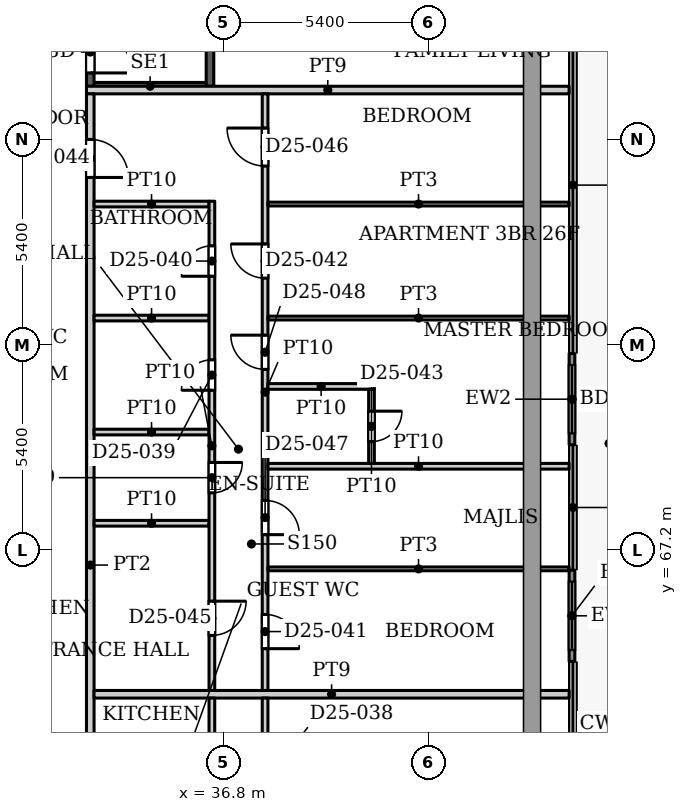
"""IFC4 building model, lengths in metres.
Left out: names, types, materials, properties, quantities, classifications, styles, units other than length and angle.
Written with IfcOpenShell. Run it as: python <this file> out.ifc"""

import sys

from ifc_helpers import new_model, si_unit, direction, frame, frame_2d, origin, place, context, subcontext, project, spatial, rectangle, extrude, source, transform, mapped, element, fill, save


model = new_model("IFC4")
c1 = context("Model", 3, precision=1e-05, world=origin(), true_north=direction((0.0, 1.0)))
c2 = subcontext(c1, "Body", "Model", "MODEL_VIEW")
j1 = project(units=[si_unit("LENGTHUNIT", "METRE"), si_unit("PLANEANGLEUNIT", "RADIAN")], contexts=[c1])
p1 = place(None, origin())
s1 = spatial("IfcSite", under=j1, at=p1, CompositionType="ELEMENT")
p2 = place(p1, origin())
s2 = spatial("IfcBuilding", under=s1, at=p2, CompositionType="ELEMENT")
p3 = place(p2, frame((0.0, 0.0, 113.6)))
s3 = spatial("IfcBuildingStorey", under=s2, at=p3, CompositionType="ELEMENT", Elevation=113.6)
p4 = place(p3, frame((45.975, 72.365, 0.0), z_axis=(0.0, 0.0, 1.0), x_axis=(0.0, -1.0, 0.0)))
e1 = element("IfcWall", 1, at=p4, inside=s3, PredefinedType="SOLIDWALL", context=c2, shape_type="SweptSolid", body=[
    extrude(rectangle(XDim=2.4, YDim=0.15, at=frame_2d((1.2, 0.0))), origin(), (0.0, 0.0, 1.0), 3.75),
])
p5 = place(p4, frame((0.3, 0.0, 0.0)))
e2 = element("IfcOpeningElement", 2, at=p5, cuts=e1, PredefinedType="OPENING", context=c2, shape_type="SweptSolid", body=[
    extrude(rectangle(XDim=1.8, YDim=2.4, at=frame_2d((0.9, 1.2))), frame((0.0, 0.085, 0.0), z_axis=(0.0, -1.0, 0.0), x_axis=(1.0, 0.0, 0.0)), (0.0, 0.0, 1.0), 0.17),
])
p6 = place(p3, frame((45.975, 66.665, 0.0), z_axis=(0.0, 0.0, 1.0), x_axis=(0.0, -1.0, 0.0)))
e3 = element("IfcWall", 3, at=p6, inside=s3, PredefinedType="SOLIDWALL", context=c2, shape_type="SweptSolid", body=[
    extrude(rectangle(XDim=2.4, YDim=0.15, at=frame_2d((1.2, 0.0))), origin(), (0.0, 0.0, 1.0), 3.75),
])
p7 = place(p6, frame((0.3, 0.0, 0.0)))
e4 = element("IfcOpeningElement", 4, at=p7, cuts=e3, PredefinedType="OPENING", context=c2, shape_type="SweptSolid", body=[
    extrude(rectangle(XDim=1.8, YDim=2.4, at=frame_2d((0.9, 1.2))), frame((0.0, 0.085, 0.0), z_axis=(0.0, -1.0, 0.0), x_axis=(1.0, 0.0, 0.0)), (0.0, 0.0, 1.0), 0.17),
])
p8 = place(p3, frame((33.3, 79.4, 0.0), z_axis=(0.0, 0.0, 1.0), x_axis=(1.0, 0.0, 0.0)))
e5 = element("IfcWall", 5, at=p8, inside=s3, PredefinedType="SHEAR", context=c2, shape_type="SweptSolid", body=[
    extrude(rectangle(XDim=3.15, YDim=0.2, at=frame_2d((1.575, 0.0))), origin(), (0.0, 0.0, 1.0), 3.9),
])
p9 = place(p3, frame((33.3, 79.4, 0.0), z_axis=(0.0, 0.0, 1.0), x_axis=(0.0, 1.0, 0.0)))
e6 = element("IfcWall", 6, at=p9, inside=s3, PredefinedType="SHEAR", context=c2, shape_type="SweptSolid", body=[
    extrude(rectangle(XDim=9.16, YDim=0.2, at=frame_2d((4.58, 0.0))), origin(), (0.0, 0.0, 1.0), 3.9),
])
p10 = place(p9, frame((0.35, 0.0, 0.0)))
e7 = element("IfcOpeningElement", 7, at=p10, cuts=e6, PredefinedType="OPENING", context=c2, shape_type="SweptSolid", body=[
    extrude(rectangle(XDim=1.1, YDim=2.2, at=frame_2d((0.55, 1.1))), frame((0.0, 0.11, 0.0), z_axis=(0.0, -1.0, 0.0), x_axis=(1.0, 0.0, 0.0)), (0.0, 0.0, 1.0), 0.22),
])
p11 = place(p3, frame((36.45, 79.4, 0.0), z_axis=(0.0, 0.0, 1.0), x_axis=(0.0, 1.0, 0.0)))
e8 = element("IfcWall", 8, at=p11, inside=s3, PredefinedType="SHEAR", context=c2, shape_type="SweptSolid", body=[
    extrude(rectangle(XDim=9.16, YDim=0.2, at=frame_2d((4.58, 0.0))), origin(), (0.0, 0.0, 1.0), 3.9),
])
p12 = place(p3, frame((33.2, 79.3, 0.0), z_axis=(0.0, 0.0, 1.0), x_axis=(1.0, 0.0, 0.0)))
e9 = element("IfcWall", 9, at=p12, inside=s3, PredefinedType="PARTITIONING", context=c2, shape_type="SweptSolid", body=[
    extrude(rectangle(XDim=12.7, YDim=0.2, at=frame_2d((6.35, 0.0))), origin(), (0.0, 0.0, 1.0), 3.6),
])
p13 = place(p3, frame((33.3, 54.4, 0.0), z_axis=(0.0, 0.0, 1.0), x_axis=(0.0, 1.0, 0.0)))
e10 = element("IfcWall", 10, at=p13, inside=s3, PredefinedType="PARTITIONING", context=c2, shape_type="SweptSolid", body=[
    extrude(rectangle(XDim=24.8, YDim=0.2, at=frame_2d((12.4, 0.0))), origin(), (0.0, 0.0, 1.0), 3.6),
])
p14 = place(p13, frame((2.5, 0.0, 0.0)))
e11 = element("IfcOpeningElement", 11, at=p14, cuts=e10, PredefinedType="OPENING", context=c2, shape_type="SweptSolid", body=[
    extrude(rectangle(XDim=1.0, YDim=2.1, at=frame_2d((0.5, 1.05))), frame((0.0, 0.11, 0.0), z_axis=(0.0, -1.0, 0.0), x_axis=(1.0, 0.0, 0.0)), (0.0, 0.0, 1.0), 0.22),
])
p15 = place(p13, frame((22.6, 0.0, 0.0)))
e12 = element("IfcOpeningElement", 12, at=p15, cuts=e10, PredefinedType="OPENING", context=c2, shape_type="SweptSolid", body=[
    extrude(rectangle(XDim=1.0, YDim=2.1, at=frame_2d((0.5, 1.05))), frame((0.0, 0.11, 0.0), z_axis=(0.0, -1.0, 0.0), x_axis=(1.0, 0.0, 0.0)), (0.0, 0.0, 1.0), 0.22),
])
p16 = place(p3, frame((33.4, 63.4, 0.0), z_axis=(0.0, 0.0, 1.0), x_axis=(1.0, 0.0, 0.0)))
e13 = element("IfcWall", 13, at=p16, inside=s3, PredefinedType="PARTITIONING", context=c2, shape_type="SweptSolid", body=[
    extrude(rectangle(XDim=12.5, YDim=0.2, at=frame_2d((6.25, 0.0))), origin(), (0.0, 0.0, 1.0), 3.6),
])
for number, where, z_axis, x_axis in (
    (14, (33.4, 67.9, 0.0), (0.0, 0.0, 1.0), (1.0, 0.0, 0.0)),
    (15, (33.4, 70.3, 0.0), (0.0, 0.0, 1.0), (1.0, 0.0, 0.0)),
    (16, (33.4, 73.3, 0.0), (0.0, 0.0, 1.0), (1.0, 0.0, 0.0)),
    (17, (33.4, 76.3, 0.0), (0.0, 0.0, 1.0), (1.0, 0.0, 0.0)),
):
    element("IfcWall", number, at=place(p3, frame(where, z_axis=z_axis, x_axis=x_axis)), inside=s3, PredefinedType="PARTITIONING", context=c2, shape_type="SweptSolid", body=[
        extrude(rectangle(XDim=3.025, YDim=0.15, at=frame_2d((1.513, 0.0))), origin(), (0.0, 0.0, 1.0), 3.6),
    ])
p17 = place(p3, frame((36.5, 58.225, 0.0), z_axis=(0.0, 0.0, 1.0), x_axis=(0.0, 1.0, 0.0)))
e18 = element("IfcWall", 18, at=p17, inside=s3, PredefinedType="PARTITIONING", context=c2, shape_type="SweptSolid", body=[
    extrude(rectangle(XDim=5.075, YDim=0.15, at=frame_2d((2.538, 0.0))), origin(), (0.0, 0.0, 1.0), 3.6),
])
p18 = place(p17, frame((3.075, 0.0, 0.0)))
e19 = element("IfcOpeningElement", 19, at=p18, cuts=e18, PredefinedType="OPENING", context=c2, shape_type="SweptSolid", body=[
    extrude(rectangle(XDim=0.9, YDim=2.1, at=frame_2d((0.45, 1.05))), frame((0.0, 0.085, 0.0), z_axis=(0.0, -1.0, 0.0), x_axis=(1.0, 0.0, 0.0)), (0.0, 0.0, 1.0), 0.17),
])
p19 = place(p17, frame((0.575, 0.0, 0.0)))
e20 = element("IfcOpeningElement", 20, at=p19, cuts=e18, PredefinedType="OPENING", context=c2, shape_type="SweptSolid", body=[
    extrude(rectangle(XDim=0.8, YDim=2.1, at=frame_2d((0.4, 1.05))), frame((0.0, 0.085, 0.0), z_axis=(0.0, -1.0, 0.0), x_axis=(1.0, 0.0, 0.0)), (0.0, 0.0, 1.0), 0.17),
])
p20 = place(p3, frame((36.5, 63.5, 0.0), z_axis=(0.0, 0.0, 1.0), x_axis=(0.0, 1.0, 0.0)))
e21 = element("IfcWall", 21, at=p20, inside=s3, PredefinedType="PARTITIONING", context=c2, shape_type="SweptSolid", body=[
    extrude(rectangle(XDim=12.875, YDim=0.15, at=frame_2d((6.438, 0.0))), origin(), (0.0, 0.0, 1.0), 3.6),
])
p21 = place(p20, frame((7.9, 0.0, 0.0)))
e22 = element("IfcOpeningElement", 22, at=p21, cuts=e21, PredefinedType="OPENING", context=c2, shape_type="SweptSolid", body=[
    extrude(rectangle(XDim=0.8, YDim=2.1, at=frame_2d((0.4, 1.05))), frame((0.0, 0.085, 0.0), z_axis=(0.0, -1.0, 0.0), x_axis=(1.0, 0.0, 0.0)), (0.0, 0.0, 1.0), 0.17),
])
p22 = place(p20, frame((10.9, 0.0, 0.0)))
e23 = element("IfcOpeningElement", 23, at=p22, cuts=e21, PredefinedType="OPENING", context=c2, shape_type="SweptSolid", body=[
    extrude(rectangle(XDim=0.8, YDim=2.1, at=frame_2d((0.4, 1.05))), frame((0.0, 0.085, 0.0), z_axis=(0.0, -1.0, 0.0), x_axis=(1.0, 0.0, 0.0)), (0.0, 0.0, 1.0), 0.17),
])
p23 = place(p20, frame((1.45, 0.0, 0.0)))
e24 = element("IfcOpeningElement", 24, at=p23, cuts=e21, PredefinedType="OPENING", context=c2, shape_type="SweptSolid", body=[
    extrude(rectangle(XDim=0.9, YDim=2.1, at=frame_2d((0.45, 1.05))), frame((0.0, 0.085, 0.0), z_axis=(0.0, -1.0, 0.0), x_axis=(1.0, 0.0, 0.0)), (0.0, 0.0, 1.0), 0.17),
])
p24 = place(p20, frame((5.2, 0.0, 0.0)))
e25 = element("IfcOpeningElement", 25, at=p24, cuts=e21, PredefinedType="OPENING", context=c2, shape_type="SweptSolid", body=[
    extrude(rectangle(XDim=0.8, YDim=2.1, at=frame_2d((0.4, 1.05))), frame((0.0, 0.085, 0.0), z_axis=(0.0, -1.0, 0.0), x_axis=(1.0, 0.0, 0.0)), (0.0, 0.0, 1.0), 0.17),
])
p25 = place(p3, frame((37.9, 54.2, 0.0), z_axis=(0.0, 0.0, 1.0), x_axis=(0.0, 1.0, 0.0)))
e26 = element("IfcWall", 26, at=p25, inside=s3, PredefinedType="PARTITIONING", context=c2, shape_type="SweptSolid", body=[
    extrude(rectangle(XDim=9.1, YDim=0.15, at=frame_2d((4.55, 0.0))), origin(), (0.0, 0.0, 1.0), 3.6),
])
p26 = place(p25, frame((6.8, 0.0, 0.0)))
e27 = element("IfcOpeningElement", 27, at=p26, cuts=e26, PredefinedType="OPENING", context=c2, shape_type="SweptSolid", body=[
    extrude(rectangle(XDim=0.9, YDim=2.1, at=frame_2d((0.45, 1.05))), frame((0.0, 0.085, 0.0), z_axis=(0.0, -1.0, 0.0), x_axis=(1.0, 0.0, 0.0)), (0.0, 0.0, 1.0), 0.17),
])
p27 = place(p25, frame((2.1, 0.0, 0.0)))
e28 = element("IfcOpeningElement", 28, at=p27, cuts=e26, PredefinedType="OPENING", context=c2, shape_type="SweptSolid", body=[
    extrude(rectangle(XDim=1.0, YDim=2.1, at=frame_2d((0.5, 1.05))), frame((0.0, 0.085, 0.0), z_axis=(0.0, -1.0, 0.0), x_axis=(1.0, 0.0, 0.0)), (0.0, 0.0, 1.0), 0.17),
])
p28 = place(p3, frame((37.9, 63.5, 0.0), z_axis=(0.0, 0.0, 1.0), x_axis=(0.0, 1.0, 0.0)))
e29 = element("IfcWall", 29, at=p28, inside=s3, PredefinedType="PARTITIONING", context=c2, shape_type="SweptSolid", body=[
    extrude(rectangle(XDim=15.7, YDim=0.15, at=frame_2d((7.85, 0.0))), origin(), (0.0, 0.0, 1.0), 3.6),
])
p29 = place(p28, frame((1.1, 0.0, 0.0)))
e30 = element("IfcOpeningElement", 30, at=p29, cuts=e29, PredefinedType="OPENING", context=c2, shape_type="SweptSolid", body=[
    extrude(rectangle(XDim=0.9, YDim=2.1, at=frame_2d((0.45, 1.05))), frame((0.0, 0.085, 0.0), z_axis=(0.0, -1.0, 0.0), x_axis=(1.0, 0.0, 0.0)), (0.0, 0.0, 1.0), 0.17),
])
p30 = place(p28, frame((10.85, 0.0, 0.0)))
e31 = element("IfcOpeningElement", 31, at=p30, cuts=e29, PredefinedType="OPENING", context=c2, shape_type="SweptSolid", body=[
    extrude(rectangle(XDim=0.9, YDim=2.1, at=frame_2d((0.45, 1.05))), frame((0.0, 0.085, 0.0), z_axis=(0.0, -1.0, 0.0), x_axis=(1.0, 0.0, 0.0)), (0.0, 0.0, 1.0), 0.17),
])
p31 = place(p28, frame((13.8, 0.0, 0.0)))
e32 = element("IfcOpeningElement", 32, at=p31, cuts=e29, PredefinedType="OPENING", context=c2, shape_type="SweptSolid", body=[
    extrude(rectangle(XDim=1.0, YDim=2.1, at=frame_2d((0.5, 1.05))), frame((0.0, 0.085, 0.0), z_axis=(0.0, -1.0, 0.0), x_axis=(1.0, 0.0, 0.0)), (0.0, 0.0, 1.0), 0.17),
])
p32 = place(p28, frame((4.1, 0.0, 0.0)))
e33 = element("IfcOpeningElement", 33, at=p32, cuts=e29, PredefinedType="OPENING", context=c2, shape_type="SweptSolid", body=[
    extrude(rectangle(XDim=0.9, YDim=2.1, at=frame_2d((0.45, 1.05))), frame((0.0, 0.085, 0.0), z_axis=(0.0, -1.0, 0.0), x_axis=(1.0, 0.0, 0.0)), (0.0, 0.0, 1.0), 0.17),
])
p33 = place(p28, frame((8.45, 0.0, 0.0)))
e34 = element("IfcOpeningElement", 34, at=p33, cuts=e29, PredefinedType="OPENING", context=c2, shape_type="SweptSolid", body=[
    extrude(rectangle(XDim=0.9, YDim=2.1, at=frame_2d((0.45, 1.05))), frame((0.0, 0.085, 0.0), z_axis=(0.0, -1.0, 0.0), x_axis=(1.0, 0.0, 0.0)), (0.0, 0.0, 1.0), 0.17),
])
p34 = place(p3, frame((37.975, 66.7, 0.0), z_axis=(0.0, 0.0, 1.0), x_axis=(1.0, 0.0, 0.0)))
e35 = element("IfcWall", 35, at=p34, inside=s3, PredefinedType="PARTITIONING", context=c2, shape_type="SweptSolid", body=[
    extrude(rectangle(XDim=7.925, YDim=0.1, at=frame_2d((3.962, 0.0))), origin(), (0.0, 0.0, 1.0), 3.6),
])
p35 = place(p3, frame((37.975, 69.4, 0.0), z_axis=(0.0, 0.0, 1.0), x_axis=(1.0, 0.0, 0.0)))
e36 = element("IfcWall", 36, at=p35, inside=s3, PredefinedType="PARTITIONING", context=c2, shape_type="SweptSolid", body=[
    extrude(rectangle(XDim=7.925, YDim=0.15, at=frame_2d((3.962, 0.0))), origin(), (0.0, 0.0, 1.0), 3.6),
])
p36 = place(p3, frame((37.975, 71.5, 0.0), z_axis=(0.0, 0.0, 1.0), x_axis=(1.0, 0.0, 0.0)))
e37 = element("IfcWall", 37, at=p36, inside=s3, PredefinedType="PARTITIONING", context=c2, shape_type="SweptSolid", body=[
    extrude(rectangle(XDim=2.8, YDim=0.15, at=frame_2d((1.4, 0.0))), origin(), (0.0, 0.0, 1.0), 3.6),
])
for number, where, z_axis, x_axis in (
    (38, (37.975, 73.3, 0.0), (0.0, 0.0, 1.0), (1.0, 0.0, 0.0)),
    (39, (37.975, 76.3, 0.0), (0.0, 0.0, 1.0), (1.0, 0.0, 0.0)),
):
    element("IfcWall", number, at=place(p3, frame(where, z_axis=z_axis, x_axis=x_axis)), inside=s3, PredefinedType="PARTITIONING", context=c2, shape_type="SweptSolid", body=[
        extrude(rectangle(XDim=7.925, YDim=0.1, at=frame_2d((3.962, 0.0))), origin(), (0.0, 0.0, 1.0), 3.6),
    ])
p37 = place(p3, frame((40.7, 69.475, 0.0), z_axis=(0.0, 0.0, 1.0), x_axis=(0.0, 1.0, 0.0)))
e40 = element("IfcWall", 40, at=p37, inside=s3, PredefinedType="PARTITIONING", context=c2, shape_type="SweptSolid", body=[
    extrude(rectangle(XDim=1.95, YDim=0.15, at=frame_2d((0.975, 0.0))), origin(), (0.0, 0.0, 1.0), 3.6),
])
p38 = place(p37, frame((0.575, 0.0, 0.0)))
e41 = element("IfcOpeningElement", 41, at=p38, cuts=e40, PredefinedType="OPENING", context=c2, shape_type="SweptSolid", body=[
    extrude(rectangle(XDim=0.8, YDim=2.1, at=frame_2d((0.4, 1.05))), frame((0.0, 0.085, 0.0), z_axis=(0.0, -1.0, 0.0), x_axis=(1.0, 0.0, 0.0)), (0.0, 0.0, 1.0), 0.17),
])
m1 = source(origin(), c2, "Body", "SweptSolid", [
    extrude(rectangle(XDim=1.8, YDim=2.4, at=frame_2d((0.9, 1.2))), frame((0.0, 0.025, 0.0), z_axis=(0.0, -1.0, 0.0), x_axis=(1.0, 0.0, 0.0)), (0.0, 0.0, 1.0), 0.05),
])
p39 = place(p5, origin())
e42 = element("IfcDoor", 42, at=p39, inside=s3, OperationType="SLIDING_TO_LEFT", PredefinedType="DOOR", context=c2, shape_type="MappedRepresentation", body=[
    mapped(m1, transform((0.0, 0.0, 0.0), x_axis=(1.0, 0.0, 0.0), y_axis=(0.0, 1.0, 0.0), z_axis=(0.0, 0.0, 1.0), scale=1.0)),
])
fill(e2, e42)
p40 = place(p7, origin())
e43 = element("IfcDoor", 43, at=p40, inside=s3, OperationType="SLIDING_TO_LEFT", PredefinedType="DOOR", context=c2, shape_type="MappedRepresentation", body=[
    mapped(m1, transform((0.0, 0.0, 0.0), x_axis=(1.0, 0.0, 0.0), y_axis=(0.0, 1.0, 0.0), z_axis=(0.0, 0.0, 1.0), scale=1.0)),
])
fill(e4, e43)
m2 = source(origin(), c2, "Body", "SweptSolid", [
    extrude(rectangle(XDim=1.1, YDim=2.2, at=frame_2d((0.55, 1.1))), frame((0.0, 0.025, 0.0), z_axis=(0.0, -1.0, 0.0), x_axis=(1.0, 0.0, 0.0)), (0.0, 0.0, 1.0), 0.05),
])
p41 = place(p10, origin())
e44 = element("IfcDoor", 44, at=p41, inside=s3, OperationType="SINGLE_SWING_RIGHT", PredefinedType="DOOR", context=c2, shape_type="MappedRepresentation", body=[
    mapped(m2, transform((0.0, 0.0, 0.0), x_axis=(1.0, 0.0, 0.0), y_axis=(0.0, 1.0, 0.0), z_axis=(0.0, 0.0, 1.0), scale=1.0)),
])
fill(e7, e44)
m3 = source(origin(), c2, "Body", "SweptSolid", [
    extrude(rectangle(XDim=0.8, YDim=2.1, at=frame_2d((0.4, 1.05))), frame((0.0, 0.025, 0.0), z_axis=(0.0, -1.0, 0.0), x_axis=(1.0, 0.0, 0.0)), (0.0, 0.0, 1.0), 0.05),
])
p42 = place(p21, origin())
e45 = element("IfcDoor", 45, at=p42, inside=s3, OperationType="SINGLE_SWING_LEFT", PredefinedType="DOOR", context=c2, shape_type="MappedRepresentation", body=[
    mapped(m3, transform((0.0, 0.0, 0.0), x_axis=(1.0, 0.0, 0.0), y_axis=(0.0, 1.0, 0.0), z_axis=(0.0, 0.0, 1.0), scale=1.0)),
])
fill(e22, e45)
p43 = place(p22, origin())
e46 = element("IfcDoor", 46, at=p43, inside=s3, OperationType="SINGLE_SWING_LEFT", PredefinedType="DOOR", context=c2, shape_type="MappedRepresentation", body=[
    mapped(m3, transform((0.0, 0.0, 0.0), x_axis=(1.0, 0.0, 0.0), y_axis=(0.0, 1.0, 0.0), z_axis=(0.0, 0.0, 1.0), scale=1.0)),
])
fill(e23, e46)
m4 = source(origin(), c2, "Body", "SweptSolid", [
    extrude(rectangle(XDim=0.9, YDim=2.1, at=frame_2d((0.45, 1.05))), frame((0.0, 0.025, 0.0), z_axis=(0.0, -1.0, 0.0), x_axis=(1.0, 0.0, 0.0)), (0.0, 0.0, 1.0), 0.05),
])
p44 = place(p29, origin())
e47 = element("IfcDoor", 47, at=p44, inside=s3, OperationType="SINGLE_SWING_RIGHT", PredefinedType="DOOR", context=c2, shape_type="MappedRepresentation", body=[
    mapped(m4, transform((0.0, 0.0, 0.0), x_axis=(1.0, 0.0, 0.0), y_axis=(0.0, 1.0, 0.0), z_axis=(0.0, 0.0, 1.0), scale=1.0)),
])
fill(e30, e47)
p45 = place(p30, origin())
e48 = element("IfcDoor", 48, at=p45, inside=s3, OperationType="SINGLE_SWING_LEFT", PredefinedType="DOOR", context=c2, shape_type="MappedRepresentation", body=[
    mapped(m4, transform((0.0, 0.0, 0.0), x_axis=(1.0, 0.0, 0.0), y_axis=(0.0, 1.0, 0.0), z_axis=(0.0, 0.0, 1.0), scale=1.0)),
])
fill(e31, e48)
p46 = place(p38, origin())
e49 = element("IfcDoor", 49, at=p46, inside=s3, OperationType="SINGLE_SWING_RIGHT", PredefinedType="DOOR", context=c2, shape_type="MappedRepresentation", body=[
    mapped(m3, transform((0.0, 0.0, 0.0), x_axis=(1.0, 0.0, 0.0), y_axis=(0.0, 1.0, 0.0), z_axis=(0.0, 0.0, 1.0), scale=1.0)),
])
fill(e41, e49)
m5 = source(origin(), c2, "Body", "SweptSolid", [
    extrude(rectangle(XDim=1.0, YDim=2.1, at=frame_2d((0.5, 1.05))), frame((0.0, 0.025, 0.0), z_axis=(0.0, -1.0, 0.0), x_axis=(1.0, 0.0, 0.0)), (0.0, 0.0, 1.0), 0.05),
])
p47 = place(p15, origin())
e50 = element("IfcDoor", 50, at=p47, inside=s3, OperationType="SINGLE_SWING_RIGHT", PredefinedType="DOOR", context=c2, shape_type="MappedRepresentation", body=[
    mapped(m5, transform((0.0, 0.0, 0.0), x_axis=(1.0, 0.0, 0.0), y_axis=(0.0, 1.0, 0.0), z_axis=(0.0, 0.0, 1.0), scale=1.0)),
])
fill(e12, e50)
p48 = place(p23, origin())
e51 = element("IfcDoor", 51, at=p48, inside=s3, OperationType="SINGLE_SWING_RIGHT", PredefinedType="DOOR", context=c2, shape_type="MappedRepresentation", body=[
    mapped(m4, transform((0.0, 0.0, 0.0), x_axis=(1.0, 0.0, 0.0), y_axis=(0.0, 1.0, 0.0), z_axis=(0.0, 0.0, 1.0), scale=1.0)),
])
fill(e24, e51)
m6 = source(origin(), c2, "Body", "SweptSolid", [
    extrude(rectangle(XDim=1.0, YDim=2.1, at=frame_2d((0.5, 1.05))), frame((0.0, 0.025, 0.0), z_axis=(0.0, -1.0, 0.0), x_axis=(1.0, 0.0, 0.0)), (0.0, 0.0, 1.0), 0.05),
])
p49 = place(p31, origin())
e52 = element("IfcDoor", 52, at=p49, inside=s3, OperationType="SINGLE_SWING_LEFT", PredefinedType="DOOR", context=c2, shape_type="MappedRepresentation", body=[
    mapped(m6, transform((0.0, 0.0, 0.0), x_axis=(1.0, 0.0, 0.0), y_axis=(0.0, 1.0, 0.0), z_axis=(0.0, 0.0, 1.0), scale=1.0)),
])
fill(e32, e52)
p50 = place(p32, origin())
e53 = element("IfcDoor", 53, at=p50, inside=s3, OperationType="SINGLE_SWING_RIGHT", PredefinedType="DOOR", context=c2, shape_type="MappedRepresentation", body=[
    mapped(m4, transform((0.0, 0.0, 0.0), x_axis=(1.0, 0.0, 0.0), y_axis=(0.0, 1.0, 0.0), z_axis=(0.0, 0.0, 1.0), scale=1.0)),
])
fill(e33, e53)
p51 = place(p33, origin())
e54 = element("IfcDoor", 54, at=p51, inside=s3, OperationType="SINGLE_SWING_LEFT", PredefinedType="DOOR", context=c2, shape_type="MappedRepresentation", body=[
    mapped(m4, transform((0.0, 0.0, 0.0), x_axis=(1.0, 0.0, 0.0), y_axis=(0.0, 1.0, 0.0), z_axis=(0.0, 0.0, 1.0), scale=1.0)),
])
fill(e34, e54)
p52 = place(p24, origin())
e55 = element("IfcDoor", 55, at=p52, inside=s3, OperationType="SINGLE_SWING_RIGHT", PredefinedType="DOOR", context=c2, shape_type="MappedRepresentation", body=[
    mapped(m3, transform((0.0, 0.0, 0.0), x_axis=(1.0, 0.0, 0.0), y_axis=(0.0, 1.0, 0.0), z_axis=(0.0, 0.0, 1.0), scale=1.0)),
])
fill(e25, e55)
save(model, sys.argv[1])
